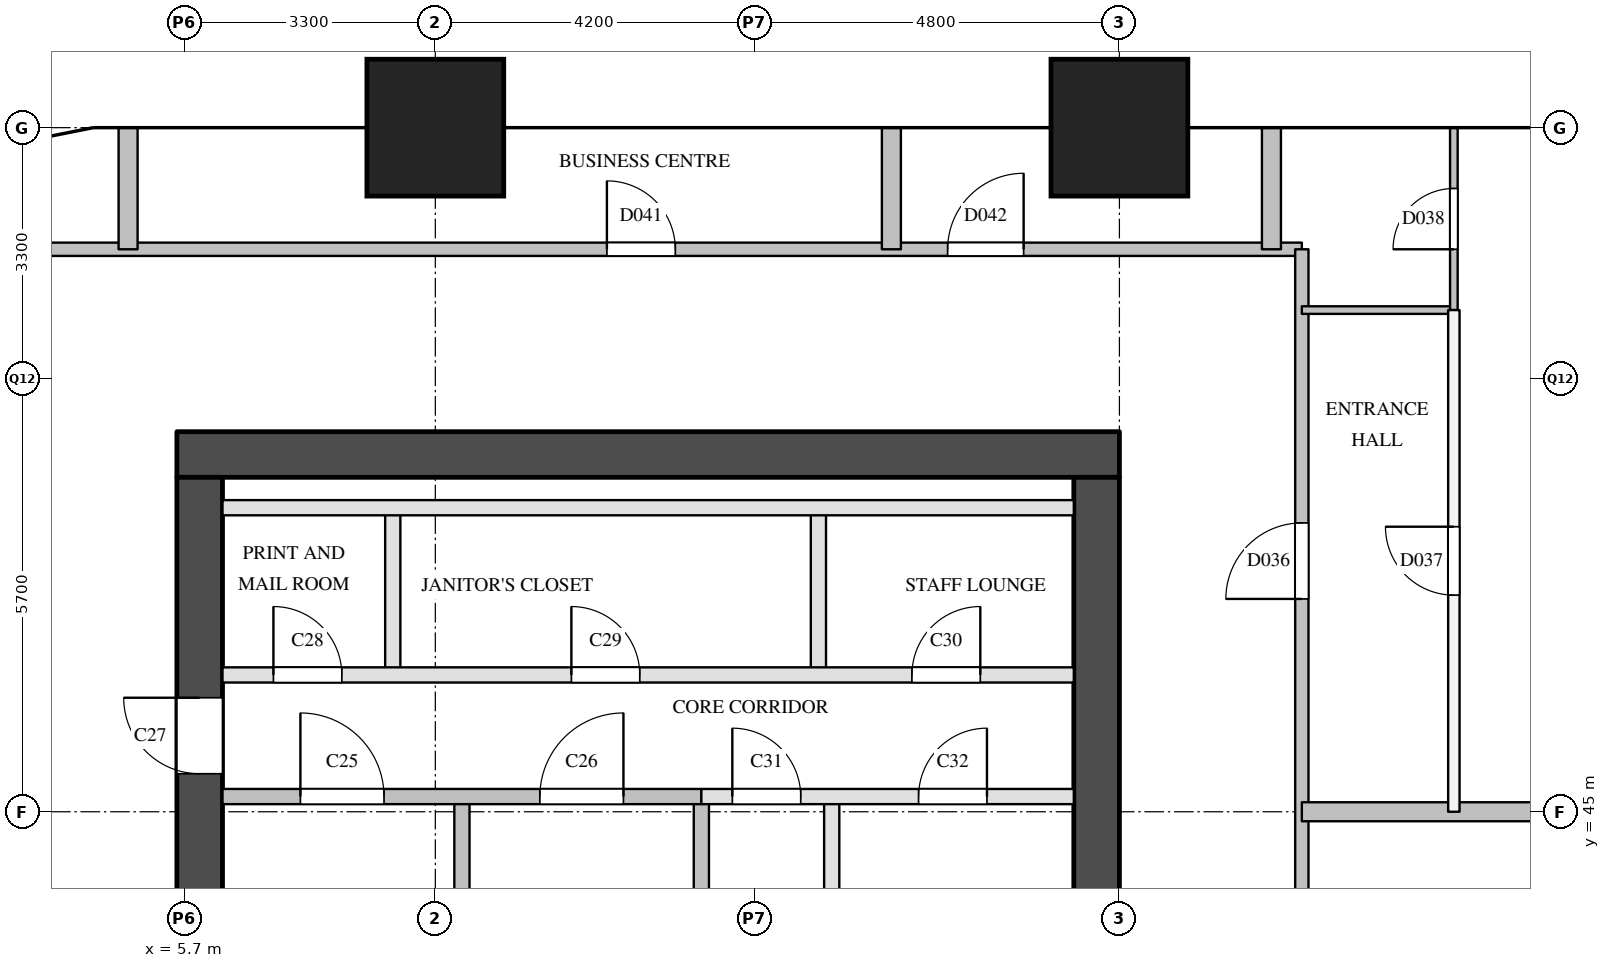
"""IFC4 building model, lengths in metres.
Left out: names, types, materials, properties, quantities, classifications, styles, units other than length and angle.
Written with IfcOpenShell. Run it as: python <this file> out.ifc"""

import sys

from ifc_helpers import new_model, si_unit, direction, frame, frame_2d, origin, origin_2d, place, context, subcontext, project, spatial, rectangle, extrude, element, fill, save


model = new_model("IFC4")
c1 = context("Model", 3, precision=1e-05, world=origin(), true_north=direction((0.0, 1.0)))
c2 = subcontext(c1, "Body", "Model", "MODEL_VIEW")
j1 = project(units=[si_unit("LENGTHUNIT", "METRE"), si_unit("PLANEANGLEUNIT", "RADIAN")], contexts=[c1])
p1 = place(None, origin())
s1 = spatial("IfcSite", under=j1, at=p1, CompositionType="ELEMENT")
p2 = place(p1, origin())
s2 = spatial("IfcBuilding", under=s1, at=p2, CompositionType="ELEMENT")
p3 = place(p2, frame((0.0, 0.0, 50.0)))
s3 = spatial("IfcBuildingStorey", under=s2, at=p3, CompositionType="ELEMENT", Elevation=50.0)
for number, where, z_axis, x_axis in (
    (1, (9.0, 54.0, 0.0), (0.0, 0.0, 1.0), (1.0, 0.0, 0.0)),
    (2, (18.0, 54.0, 0.0), (0.0, 0.0, 1.0), (1.0, 0.0, 0.0)),
):
    element("IfcColumn", number, at=place(p3, frame(where, z_axis=z_axis, x_axis=x_axis)), inside=s3, PredefinedType="COLUMN", context=c2, shape_type="SweptSolid", body=[
        extrude(rectangle(XDim=1.8, YDim=1.8, at=origin_2d()), origin(), (0.0, 0.0, 1.0), 3.8),
    ])
p4 = place(p3, frame((5.6, 49.7, 0.0), z_axis=(0.0, 0.0, 1.0), x_axis=(1.0, 0.0, 0.0)))
e3 = element("IfcWall", 3, at=p4, inside=s3, PredefinedType="SHEAR", context=c2, shape_type="SweptSolid", body=[
    extrude(rectangle(XDim=12.4, YDim=0.6, at=frame_2d((6.2, 0.0))), origin(), (0.0, 0.0, 1.0), 3.5),
])
p5 = place(p3, frame((5.9, 29.1, 0.0), z_axis=(0.0, 0.0, 1.0), x_axis=(0.0, 1.0, 0.0)))
e4 = element("IfcWall", 4, at=p5, inside=s3, PredefinedType="SHEAR", context=c2, shape_type="SweptSolid", body=[
    extrude(rectangle(XDim=20.3, YDim=0.6, at=frame_2d((10.15, 0.0))), origin(), (0.0, 0.0, 1.0), 3.5),
])
p6 = place(p5, frame((3.6, 0.0, 0.0)))
e5 = element("IfcOpeningElement", 5, at=p6, cuts=e4, PredefinedType="OPENING", context=c2, shape_type="SweptSolid", body=[
    extrude(rectangle(XDim=1.8, YDim=2.1, at=frame_2d((0.9, 1.05))), frame((0.0, 0.31, 0.0), z_axis=(0.0, -1.0, 0.0), x_axis=(1.0, 0.0, 0.0)), (0.0, 0.0, 1.0), 0.62),
])
p7 = place(p5, frame((16.4, 0.0, 0.0)))
e6 = element("IfcOpeningElement", 6, at=p7, cuts=e4, PredefinedType="OPENING", context=c2, shape_type="SweptSolid", body=[
    extrude(rectangle(XDim=1.0, YDim=2.1, at=frame_2d((0.5, 1.05))), frame((0.0, 0.31, 0.0), z_axis=(0.0, -1.0, 0.0), x_axis=(1.0, 0.0, 0.0)), (0.0, 0.0, 1.0), 0.62),
])
p8 = place(p3, frame((17.7, 29.1, 0.0), z_axis=(0.0, 0.0, 1.0), x_axis=(0.0, 1.0, 0.0)))
e7 = element("IfcWall", 7, at=p8, inside=s3, PredefinedType="SHEAR", context=c2, shape_type="SweptSolid", body=[
    extrude(rectangle(XDim=20.3, YDim=0.6, at=frame_2d((10.15, 0.0))), origin(), (0.0, 0.0, 1.0), 3.5),
])
p9 = place(p8, frame((1.25, 0.0, 0.0)))
e8 = element("IfcOpeningElement", 8, at=p9, cuts=e7, PredefinedType="OPENING", context=c2, shape_type="SweptSolid", body=[
    extrude(rectangle(XDim=0.7, YDim=2.1, at=frame_2d((0.35, 1.05))), frame((0.0, 0.31, 0.0), z_axis=(0.0, -1.0, 0.0), x_axis=(1.0, 0.0, 0.0)), (0.0, 0.0, 1.0), 0.62),
])
p10 = place(p8, frame((7.05, 0.0, 0.0)))
e9 = element("IfcOpeningElement", 9, at=p10, cuts=e7, PredefinedType="OPENING", context=c2, shape_type="SweptSolid", body=[
    extrude(rectangle(XDim=0.7, YDim=2.1, at=frame_2d((0.35, 1.05))), frame((0.0, 0.31, 0.0), z_axis=(0.0, -1.0, 0.0), x_axis=(1.0, 0.0, 0.0)), (0.0, 0.0, 1.0), 0.62),
])
p11 = place(p3, frame((8.44, 46.8, 0.0), z_axis=(0.0, 0.0, 1.0), x_axis=(0.0, 1.0, 0.0)))
e10 = element("IfcWall", 10, at=p11, inside=s3, PredefinedType="PARTITIONING", context=c2, shape_type="SweptSolid", body=[
    extrude(rectangle(XDim=2.2, YDim=0.2, at=frame_2d((1.1, 0.0))), origin(), (0.0, 0.0, 1.0), 3.5),
])
for number, where, z_axis, x_axis in (
    (11, (9.35, 40.9, 0.0), (0.0, 0.0, 1.0), (0.0, 1.0, 0.0)),
    (12, (12.5, 40.9, 0.0), (0.0, 0.0, 1.0), (0.0, 1.0, 0.0)),
):
    element("IfcWall", number, at=place(p3, frame(where, z_axis=z_axis, x_axis=x_axis)), inside=s3, PredefinedType="SOLIDWALL", context=c2, shape_type="SweptSolid", body=[
        extrude(rectangle(XDim=4.3, YDim=0.2, at=frame_2d((2.15, 0.0))), origin(), (0.0, 0.0, 1.0), 3.5),
    ])
p12 = place(p3, frame((14.04, 46.8, 0.0), z_axis=(0.0, 0.0, 1.0), x_axis=(0.0, 1.0, 0.0)))
e13 = element("IfcWall", 13, at=p12, inside=s3, PredefinedType="PARTITIONING", context=c2, shape_type="SweptSolid", body=[
    extrude(rectangle(XDim=2.2, YDim=0.2, at=frame_2d((1.1, 0.0))), origin(), (0.0, 0.0, 1.0), 3.5),
])
p13 = place(p3, frame((14.215, 39.0, 0.0), z_axis=(0.0, 0.0, 1.0), x_axis=(0.0, 1.0, 0.0)))
e14 = element("IfcWall", 14, at=p13, inside=s3, PredefinedType="PARTITIONING", context=c2, shape_type="SweptSolid", body=[
    extrude(rectangle(XDim=6.2, YDim=0.2, at=frame_2d((3.1, 0.0))), origin(), (0.0, 0.0, 1.0), 3.5),
])
p14 = place(p3, frame((12.5, 45.2, 0.0), z_axis=(0.0, 0.0, 1.0), x_axis=(1.0, 0.0, 0.0)))
e15 = element("IfcWall", 15, at=p14, inside=s3, PredefinedType="PARTITIONING", context=c2, shape_type="SweptSolid", body=[
    extrude(rectangle(XDim=4.9, YDim=0.2, at=frame_2d((2.45, 0.0))), origin(), (0.0, 0.0, 1.0), 3.5),
])
p15 = place(p14, frame((0.407, 0.0, 0.0)))
e16 = element("IfcOpeningElement", 16, at=p15, cuts=e15, PredefinedType="OPENING", context=c2, shape_type="SweptSolid", body=[
    extrude(rectangle(XDim=0.9, YDim=2.1, at=frame_2d((0.45, 1.05))), frame((0.0, 0.11, 0.0), z_axis=(0.0, -1.0, 0.0), x_axis=(1.0, 0.0, 0.0)), (0.0, 0.0, 1.0), 0.22),
])
p16 = place(p14, frame((2.857, 0.0, 0.0)))
e17 = element("IfcOpeningElement", 17, at=p16, cuts=e15, PredefinedType="OPENING", context=c2, shape_type="SweptSolid", body=[
    extrude(rectangle(XDim=0.9, YDim=2.1, at=frame_2d((0.45, 1.05))), frame((0.0, 0.11, 0.0), z_axis=(0.0, -1.0, 0.0), x_axis=(1.0, 0.0, 0.0)), (0.0, 0.0, 1.0), 0.22),
])
p17 = place(p3, frame((6.2, 45.2, 0.0), z_axis=(0.0, 0.0, 1.0), x_axis=(1.0, 0.0, 0.0)))
e18 = element("IfcWall", 18, at=p17, inside=s3, PredefinedType="SOLIDWALL", context=c2, shape_type="SweptSolid", body=[
    extrude(rectangle(XDim=6.3, YDim=0.2, at=frame_2d((3.15, 0.0))), origin(), (0.0, 0.0, 1.0), 3.5),
])
p18 = place(p17, frame((1.025, 0.0, 0.0)))
e19 = element("IfcOpeningElement", 19, at=p18, cuts=e18, PredefinedType="OPENING", context=c2, shape_type="SweptSolid", body=[
    extrude(rectangle(XDim=1.1, YDim=2.1, at=frame_2d((0.55, 1.05))), frame((0.0, 0.11, 0.0), z_axis=(0.0, -1.0, 0.0), x_axis=(1.0, 0.0, 0.0)), (0.0, 0.0, 1.0), 0.22),
])
p19 = place(p17, frame((4.175, 0.0, 0.0)))
e20 = element("IfcOpeningElement", 20, at=p19, cuts=e18, PredefinedType="OPENING", context=c2, shape_type="SweptSolid", body=[
    extrude(rectangle(XDim=1.1, YDim=2.1, at=frame_2d((0.55, 1.05))), frame((0.0, 0.11, 0.0), z_axis=(0.0, -1.0, 0.0), x_axis=(1.0, 0.0, 0.0)), (0.0, 0.0, 1.0), 0.22),
])
p20 = place(p3, frame((6.2, 46.8, 0.0), z_axis=(0.0, 0.0, 1.0), x_axis=(1.0, 0.0, 0.0)))
e21 = element("IfcWall", 21, at=p20, inside=s3, PredefinedType="PARTITIONING", context=c2, shape_type="SweptSolid", body=[
    extrude(rectangle(XDim=11.2, YDim=0.2, at=frame_2d((5.6, 0.0))), origin(), (0.0, 0.0, 1.0), 3.5),
])
p21 = place(p20, frame((0.67, 0.0, 0.0)))
e22 = element("IfcOpeningElement", 22, at=p21, cuts=e21, PredefinedType="OPENING", context=c2, shape_type="SweptSolid", body=[
    extrude(rectangle(XDim=0.9, YDim=2.1, at=frame_2d((0.45, 1.05))), frame((0.0, 0.11, 0.0), z_axis=(0.0, -1.0, 0.0), x_axis=(1.0, 0.0, 0.0)), (0.0, 0.0, 1.0), 0.22),
])
p22 = place(p20, frame((4.59, 0.0, 0.0)))
e23 = element("IfcOpeningElement", 23, at=p22, cuts=e21, PredefinedType="OPENING", context=c2, shape_type="SweptSolid", body=[
    extrude(rectangle(XDim=0.9, YDim=2.1, at=frame_2d((0.45, 1.05))), frame((0.0, 0.11, 0.0), z_axis=(0.0, -1.0, 0.0), x_axis=(1.0, 0.0, 0.0)), (0.0, 0.0, 1.0), 0.22),
])
p23 = place(p20, frame((9.07, 0.0, 0.0)))
e24 = element("IfcOpeningElement", 24, at=p23, cuts=e21, PredefinedType="OPENING", context=c2, shape_type="SweptSolid", body=[
    extrude(rectangle(XDim=0.9, YDim=2.1, at=frame_2d((0.45, 1.05))), frame((0.0, 0.11, 0.0), z_axis=(0.0, -1.0, 0.0), x_axis=(1.0, 0.0, 0.0)), (0.0, 0.0, 1.0), 0.22),
])
p24 = place(p3, frame((6.2, 49.0, 0.0), z_axis=(0.0, 0.0, 1.0), x_axis=(1.0, 0.0, 0.0)))
e25 = element("IfcWall", 25, at=p24, inside=s3, PredefinedType="PARTITIONING", context=c2, shape_type="SweptSolid", body=[
    extrude(rectangle(XDim=11.2, YDim=0.2, at=frame_2d((5.6, 0.0))), origin(), (0.0, 0.0, 1.0), 3.5),
])
p25 = place(p3, frame((3.2, 52.4, 0.0), z_axis=(0.0, 0.0, 1.0), x_axis=(1.0, 0.0, 0.0)))
e26 = element("IfcWall", 26, at=p25, inside=s3, PredefinedType="PARTITIONING", context=c2, shape_type="SweptSolid", body=[
    extrude(rectangle(XDim=17.2, YDim=0.175, at=frame_2d((8.6, 0.0))), origin(), (0.0, 0.0, 1.0), 3.5),
])
p26 = place(p25, frame((8.058, 0.0, 0.0)))
e27 = element("IfcOpeningElement", 27, at=p26, cuts=e26, PredefinedType="OPENING", context=c2, shape_type="SweptSolid", body=[
    extrude(rectangle(XDim=0.9, YDim=2.1, at=frame_2d((0.45, 1.05))), frame((0.0, 0.097, 0.0), z_axis=(0.0, -1.0, 0.0), x_axis=(1.0, 0.0, 0.0)), (0.0, 0.0, 1.0), 0.195),
])
p27 = place(p25, frame((12.54, 0.0, 0.0)))
e28 = element("IfcOpeningElement", 28, at=p27, cuts=e26, PredefinedType="OPENING", context=c2, shape_type="SweptSolid", body=[
    extrude(rectangle(XDim=1.0, YDim=2.1, at=frame_2d((0.5, 1.05))), frame((0.0, 0.097, 0.0), z_axis=(0.0, -1.0, 0.0), x_axis=(1.0, 0.0, 0.0)), (0.0, 0.0, 1.0), 0.195),
])
p28 = place(p3, frame((20.4, 41.2, 0.0), z_axis=(0.0, 0.0, 1.0), x_axis=(0.0, 1.0, 0.0)))
e29 = element("IfcWall", 29, at=p28, inside=s3, PredefinedType="PARTITIONING", context=c2, shape_type="SweptSolid", body=[
    extrude(rectangle(XDim=11.2, YDim=0.175, at=frame_2d((5.6, 0.0))), origin(), (0.0, 0.0, 1.0), 3.5),
])
p29 = place(p28, frame((6.6, 0.0, 0.0)))
e30 = element("IfcOpeningElement", 30, at=p29, cuts=e29, PredefinedType="OPENING", context=c2, shape_type="SweptSolid", body=[
    extrude(rectangle(XDim=1.0, YDim=2.1, at=frame_2d((0.5, 1.05))), frame((0.0, 0.097, 0.0), z_axis=(0.0, -1.0, 0.0), x_axis=(1.0, 0.0, 0.0)), (0.0, 0.0, 1.0), 0.195),
])
p30 = place(p3, frame((22.4, 45.0, 0.0), z_axis=(0.0, 0.0, 1.0), x_axis=(0.0, 1.0, 0.0)))
e31 = element("IfcWall", 31, at=p30, inside=s3, PredefinedType="PARTITIONING", context=c2, shape_type="SweptSolid", body=[
    extrude(rectangle(XDim=6.6, YDim=0.15, at=frame_2d((3.3, 0.0))), origin(), (0.0, 0.0, 1.0), 3.5),
])
p31 = place(p30, frame((2.85, 0.0, 0.0)))
e32 = element("IfcOpeningElement", 32, at=p31, cuts=e31, PredefinedType="OPENING", context=c2, shape_type="SweptSolid", body=[
    extrude(rectangle(XDim=0.9, YDim=2.1, at=frame_2d((0.45, 1.05))), frame((0.0, 0.085, 0.0), z_axis=(0.0, -1.0, 0.0), x_axis=(1.0, 0.0, 0.0)), (0.0, 0.0, 1.0), 0.17),
])
p32 = place(p3, frame((20.4, 45.0, 0.0), z_axis=(0.0, 0.0, 1.0), x_axis=(1.0, 0.0, 0.0)))
e33 = element("IfcWall", 33, at=p32, inside=s3, PredefinedType="PARTITIONING", context=c2, shape_type="SweptSolid", body=[
    extrude(rectangle(XDim=13.2, YDim=0.25, at=frame_2d((6.6, 0.0))), origin(), (0.0, 0.0, 1.0), 3.5),
])
for number, where, z_axis, x_axis in (
    (34, (4.958, 52.4, 0.0), (0.0, 0.0, 1.0), (0.0, 1.0, 0.0)),
    (35, (15.0, 52.4, 0.0), (0.0, 0.0, 1.0), (0.0, 1.0, 0.0)),
    (36, (20.0, 52.4, 0.0), (0.0, 0.0, 1.0), (0.0, 1.0, 0.0)),
):
    element("IfcWall", number, at=place(p3, frame(where, z_axis=z_axis, x_axis=x_axis)), inside=s3, PredefinedType="PARTITIONING", context=c2, shape_type="SweptSolid", body=[
        extrude(rectangle(XDim=1.6, YDim=0.25, at=frame_2d((0.8, 0.0))), origin(), (0.0, 0.0, 1.0), 2.5),
    ])
p33 = place(p3, frame((20.4, 51.6, 0.0), z_axis=(0.0, 0.0, 1.0), x_axis=(1.0, 0.0, 0.0)))
e37 = element("IfcWall", 37, at=p33, inside=s3, PredefinedType="PARTITIONING", context=c2, shape_type="SweptSolid", body=[
    extrude(rectangle(XDim=2.0, YDim=0.1, at=frame_2d((1.0, 0.0))), origin(), (0.0, 0.0, 1.0), 3.5),
])
p34 = place(p3, frame((22.4, 51.6, 0.0), z_axis=(0.0, 0.0, 1.0), x_axis=(0.0, 1.0, 0.0)))
e38 = element("IfcWall", 38, at=p34, inside=s3, PredefinedType="PARTITIONING", context=c2, shape_type="SweptSolid", body=[
    extrude(rectangle(XDim=2.4, YDim=0.1, at=frame_2d((1.2, 0.0))), origin(), (0.0, 0.0, 1.0), 2.5),
])
p35 = place(p34, frame((0.8, 0.0, 0.0)))
e39 = element("IfcOpeningElement", 39, at=p35, cuts=e38, PredefinedType="OPENING", context=c2, shape_type="SweptSolid", body=[
    extrude(rectangle(XDim=0.8, YDim=2.1, at=frame_2d((0.4, 1.05))), frame((0.0, 0.06, 0.0), z_axis=(0.0, -1.0, 0.0), x_axis=(1.0, 0.0, 0.0)), (0.0, 0.0, 1.0), 0.12),
])
p36 = place(p18, origin())
e40 = element("IfcDoor", 40, at=p36, inside=s3, OperationType="SINGLE_SWING_LEFT", PredefinedType="DOOR", context=c2, shape_type="SweptSolid", body=[
    extrude(rectangle(XDim=1.1, YDim=2.1, at=frame_2d((0.55, 1.05))), frame((0.0, 0.025, 0.0), z_axis=(0.0, -1.0, 0.0), x_axis=(1.0, 0.0, 0.0)), (0.0, 0.0, 1.0), 0.05),
])
fill(e19, e40)
p37 = place(p19, origin())
e41 = element("IfcDoor", 41, at=p37, inside=s3, OperationType="SINGLE_SWING_RIGHT", PredefinedType="DOOR", context=c2, shape_type="SweptSolid", body=[
    extrude(rectangle(XDim=1.1, YDim=2.1, at=frame_2d((0.55, 1.05))), frame((0.0, 0.025, 0.0), z_axis=(0.0, -1.0, 0.0), x_axis=(1.0, 0.0, 0.0)), (0.0, 0.0, 1.0), 0.05),
])
fill(e20, e41)
p38 = place(p7, origin())
e42 = element("IfcDoor", 42, at=p38, inside=s3, OperationType="SINGLE_SWING_RIGHT", PredefinedType="DOOR", context=c2, shape_type="SweptSolid", body=[
    extrude(rectangle(XDim=1.0, YDim=2.1, at=frame_2d((0.5, 1.05))), frame((0.0, 0.025, 0.0), z_axis=(0.0, -1.0, 0.0), x_axis=(1.0, 0.0, 0.0)), (0.0, 0.0, 1.0), 0.05),
])
fill(e6, e42)
p39 = place(p21, origin())
e43 = element("IfcDoor", 43, at=p39, inside=s3, OperationType="SINGLE_SWING_LEFT", PredefinedType="DOOR", context=c2, shape_type="SweptSolid", body=[
    extrude(rectangle(XDim=0.9, YDim=2.1, at=frame_2d((0.45, 1.05))), frame((0.0, 0.025, 0.0), z_axis=(0.0, -1.0, 0.0), x_axis=(1.0, 0.0, 0.0)), (0.0, 0.0, 1.0), 0.05),
])
fill(e22, e43)
p40 = place(p22, origin())
e44 = element("IfcDoor", 44, at=p40, inside=s3, OperationType="SINGLE_SWING_LEFT", PredefinedType="DOOR", context=c2, shape_type="SweptSolid", body=[
    extrude(rectangle(XDim=0.9, YDim=2.1, at=frame_2d((0.45, 1.05))), frame((0.0, 0.025, 0.0), z_axis=(0.0, -1.0, 0.0), x_axis=(1.0, 0.0, 0.0)), (0.0, 0.0, 1.0), 0.05),
])
fill(e23, e44)
p41 = place(p23, origin())
e45 = element("IfcDoor", 45, at=p41, inside=s3, OperationType="SINGLE_SWING_RIGHT", PredefinedType="DOOR", context=c2, shape_type="SweptSolid", body=[
    extrude(rectangle(XDim=0.9, YDim=2.1, at=frame_2d((0.45, 1.05))), frame((0.0, 0.025, 0.0), z_axis=(0.0, -1.0, 0.0), x_axis=(1.0, 0.0, 0.0)), (0.0, 0.0, 1.0), 0.05),
])
fill(e24, e45)
p42 = place(p15, origin())
e46 = element("IfcDoor", 46, at=p42, inside=s3, OperationType="SINGLE_SWING_LEFT", PredefinedType="DOOR", context=c2, shape_type="SweptSolid", body=[
    extrude(rectangle(XDim=0.9, YDim=2.1, at=frame_2d((0.45, 1.05))), frame((0.0, 0.025, 0.0), z_axis=(0.0, -1.0, 0.0), x_axis=(1.0, 0.0, 0.0)), (0.0, 0.0, 1.0), 0.05),
])
fill(e16, e46)
p43 = place(p16, origin())
e47 = element("IfcDoor", 47, at=p43, inside=s3, OperationType="SINGLE_SWING_RIGHT", PredefinedType="DOOR", context=c2, shape_type="SweptSolid", body=[
    extrude(rectangle(XDim=0.9, YDim=2.1, at=frame_2d((0.45, 1.05))), frame((0.0, 0.025, 0.0), z_axis=(0.0, -1.0, 0.0), x_axis=(1.0, 0.0, 0.0)), (0.0, 0.0, 1.0), 0.05),
])
fill(e17, e47)
p44 = place(p29, origin())
e48 = element("IfcDoor", 48, at=p44, inside=s3, OperationType="SINGLE_SWING_LEFT", PredefinedType="DOOR", context=c2, shape_type="SweptSolid", body=[
    extrude(rectangle(XDim=1.0, YDim=2.1, at=frame_2d((0.5, 1.05))), frame((0.0, 0.025, 0.0), z_axis=(0.0, -1.0, 0.0), x_axis=(1.0, 0.0, 0.0)), (0.0, 0.0, 1.0), 0.05),
])
fill(e30, e48)
p45 = place(p31, origin())
e49 = element("IfcDoor", 49, at=p45, inside=s3, OperationType="SINGLE_SWING_RIGHT", PredefinedType="DOOR", context=c2, shape_type="SweptSolid", body=[
    extrude(rectangle(XDim=0.9, YDim=2.1, at=frame_2d((0.45, 1.05))), frame((0.0, 0.025, 0.0), z_axis=(0.0, -1.0, 0.0), x_axis=(1.0, 0.0, 0.0)), (0.0, 0.0, 1.0), 0.05),
])
fill(e32, e49)
p46 = place(p35, origin())
e50 = element("IfcDoor", 50, at=p46, inside=s3, OperationType="SINGLE_SWING_LEFT", PredefinedType="DOOR", context=c2, shape_type="SweptSolid", body=[
    extrude(rectangle(XDim=0.8, YDim=2.1, at=frame_2d((0.4, 1.05))), frame((0.0, 0.025, 0.0), z_axis=(0.0, -1.0, 0.0), x_axis=(1.0, 0.0, 0.0)), (0.0, 0.0, 1.0), 0.05),
])
fill(e39, e50)
p47 = place(p26, origin())
e51 = element("IfcDoor", 51, at=p47, inside=s3, OperationType="SINGLE_SWING_LEFT", PredefinedType="DOOR", context=c2, shape_type="SweptSolid", body=[
    extrude(rectangle(XDim=0.9, YDim=2.1, at=frame_2d((0.45, 1.05))), frame((0.0, 0.025, 0.0), z_axis=(0.0, -1.0, 0.0), x_axis=(1.0, 0.0, 0.0)), (0.0, 0.0, 1.0), 0.05),
])
fill(e27, e51)
p48 = place(p27, origin())
e52 = element("IfcDoor", 52, at=p48, inside=s3, OperationType="SINGLE_SWING_RIGHT", PredefinedType="DOOR", context=c2, shape_type="SweptSolid", body=[
    extrude(rectangle(XDim=1.0, YDim=2.1, at=frame_2d((0.5, 1.05))), frame((0.0, 0.025, 0.0), z_axis=(0.0, -1.0, 0.0), x_axis=(1.0, 0.0, 0.0)), (0.0, 0.0, 1.0), 0.05),
])
fill(e28, e52)
save(model, sys.argv[1])
